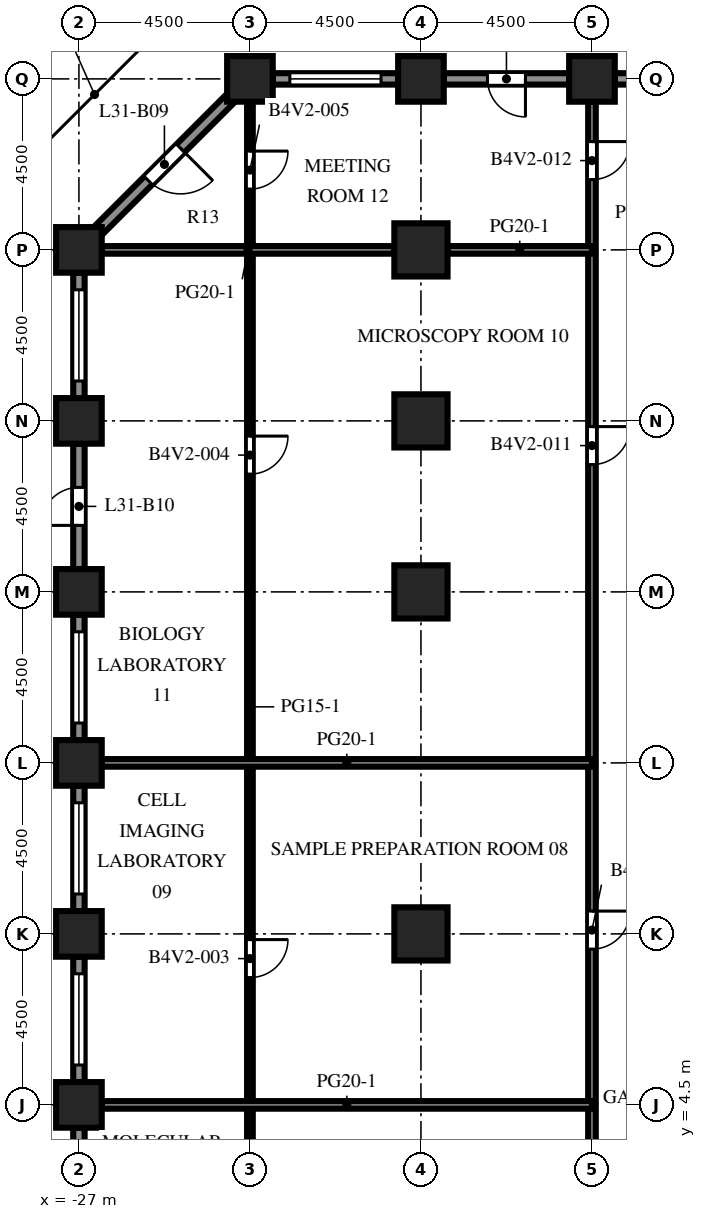
"""IFC4 building model, lengths in metres.
Left out: names, types, materials, properties, quantities, classifications, styles, units other than length and angle.
Written with IfcOpenShell. Run it as: python <this file> out.ifc"""

import sys

from ifc_helpers import new_model, si_unit, direction, frame, frame_2d, origin, origin_2d, place, context, subcontext, project, spatial, rectangle, extrude, element, fill, save


model = new_model("IFC4")
c1 = context("Model", 3, precision=1e-05, world=origin(), true_north=direction((0.0, 1.0)))
c2 = subcontext(c1, "Body", "Model", "MODEL_VIEW")
j1 = project(units=[si_unit("LENGTHUNIT", "METRE"), si_unit("PLANEANGLEUNIT", "RADIAN")], contexts=[c1])
p1 = place(None, origin())
s1 = spatial("IfcSite", under=j1, at=p1, CompositionType="ELEMENT")
p2 = place(p1, origin())
s2 = spatial("IfcBuilding", under=s1, at=p2, CompositionType="ELEMENT")
p3 = place(p2, frame((0.0, 0.0, 137.2)))
s3 = spatial("IfcBuildingStorey", under=s2, at=p3, CompositionType="ELEMENT", Elevation=137.2)
for number, where, z_axis, x_axis in (
    (1, (-27.0, 4.5, 0.0), (0.0, 0.0, 1.0), (1.0, 0.0, 0.0)),
    (2, (-27.0, 9.0, 0.0), (0.0, 0.0, 1.0), (1.0, 0.0, 0.0)),
    (3, (-27.0, 13.5, 0.0), (0.0, 0.0, 1.0), (1.0, 0.0, 0.0)),
    (4, (-27.0, 18.0, 0.0), (0.0, 0.0, 1.0), (1.0, 0.0, 0.0)),
    (5, (-27.0, 22.5, 0.0), (0.0, 0.0, 1.0), (1.0, 0.0, 0.0)),
    (6, (-27.0, 27.0, 0.0), (0.0, 0.0, 1.0), (1.0, 0.0, 0.0)),
    (7, (-22.5, 31.5, 0.0), (0.0, 0.0, 1.0), (1.0, 0.0, 0.0)),
    (8, (-18.0, 31.5, 0.0), (0.0, 0.0, 1.0), (1.0, 0.0, 0.0)),
    (9, (-13.5, 31.5, 0.0), (0.0, 0.0, 1.0), (1.0, 0.0, 0.0)),
):
    element("IfcColumn", number, at=place(p3, frame(where, z_axis=z_axis, x_axis=x_axis)), inside=s3, PredefinedType="COLUMN", context=c2, shape_type="SweptSolid", body=[
        extrude(rectangle(XDim=1.2, YDim=1.2, at=origin_2d()), origin(), (0.0, 0.0, 1.0), 4.1),
    ])
for number, where, z_axis, x_axis in (
    (10, (-18.0, 9.0, 0.0), (0.0, 0.0, 1.0), (1.0, 0.0, 0.0)),
    (11, (-18.0, 18.0, 0.0), (0.0, 0.0, 1.0), (1.0, 0.0, 0.0)),
    (12, (-18.0, 22.5, 0.0), (0.0, 0.0, 1.0), (1.0, 0.0, 0.0)),
    (13, (-18.0, 27.0, 0.0), (0.0, 0.0, 1.0), (1.0, 0.0, 0.0)),
):
    element("IfcColumn", number, at=place(p3, frame(where, z_axis=z_axis, x_axis=x_axis)), inside=s3, PredefinedType="COLUMN", context=c2, shape_type="SweptSolid", body=[
        extrude(rectangle(XDim=1.4, YDim=1.4, at=origin_2d()), origin(), (0.0, 0.0, 1.0), 4.1),
    ])
p4 = place(p3, frame((-12.9, 31.5, 0.0), z_axis=(0.0, 0.0, 1.0), x_axis=(1.0, 0.0, 0.0)))
e14 = element("IfcWall", 14, at=p4, inside=s3, PredefinedType="SOLIDWALL", context=c2, shape_type="SweptSolid", body=[
    extrude(rectangle(XDim=3.3, YDim=0.3, at=frame_2d((1.65, 0.0))), origin(), (0.0, 0.0, 1.0), 2.75),
])
p5 = place(p4, frame((0.525, 0.0, 0.8)))
e15 = element("IfcOpeningElement", 15, at=p5, cuts=e14, PredefinedType="OPENING", context=c2, shape_type="SweptSolid", body=[
    extrude(rectangle(XDim=1.2, YDim=1.7, at=frame_2d((0.6, 0.85))), frame((0.0, 0.16, 0.0), z_axis=(0.0, -1.0, 0.0), x_axis=(1.0, 0.0, 0.0)), (0.0, 0.0, 1.0), 0.32),
])
p6 = place(p3, frame((-17.4, 31.5, 0.0), z_axis=(0.0, 0.0, 1.0), x_axis=(1.0, 0.0, 0.0)))
e16 = element("IfcWall", 16, at=p6, inside=s3, PredefinedType="SOLIDWALL", context=c2, shape_type="SweptSolid", body=[
    extrude(rectangle(XDim=3.3, YDim=0.3, at=frame_2d((1.65, 0.0))), origin(), (0.0, 0.0, 1.0), 2.75),
])
p7 = place(p6, frame((1.15, 0.0, 0.0)))
e17 = element("IfcOpeningElement", 17, at=p7, cuts=e16, PredefinedType="OPENING", context=c2, shape_type="SweptSolid", body=[
    extrude(rectangle(XDim=1.0, YDim=2.2, at=frame_2d((0.5, 1.1))), frame((0.0, 0.16, 0.0), z_axis=(0.0, -1.0, 0.0), x_axis=(1.0, 0.0, 0.0)), (0.0, 0.0, 1.0), 0.32),
])
p8 = place(p3, frame((-21.9, 31.5, 0.0), z_axis=(0.0, 0.0, 1.0), x_axis=(1.0, 0.0, 0.0)))
e18 = element("IfcWall", 18, at=p8, inside=s3, PredefinedType="SOLIDWALL", context=c2, shape_type="SweptSolid", body=[
    extrude(rectangle(XDim=3.3, YDim=0.3, at=frame_2d((1.65, 0.0))), origin(), (0.0, 0.0, 1.0), 2.75),
])
p9 = place(p8, frame((0.45, 0.0, 0.8)))
e19 = element("IfcOpeningElement", 19, at=p9, cuts=e18, PredefinedType="OPENING", context=c2, shape_type="SweptSolid", body=[
    extrude(rectangle(XDim=2.4, YDim=1.7, at=frame_2d((1.2, 0.85))), frame((0.0, 0.16, 0.0), z_axis=(0.0, -1.0, 0.0), x_axis=(1.0, 0.0, 0.0)), (0.0, 0.0, 1.0), 0.32),
])
p10 = place(p3, frame((-26.506, 27.494, 0.0), z_axis=(0.0, 0.0, 1.0), x_axis=(0.707106781187, 0.707106781187, 0.0)))
e20 = element("IfcWall", 20, at=p10, inside=s3, PredefinedType="SOLIDWALL", context=c2, shape_type="SweptSolid", body=[
    extrude(rectangle(XDim=4.967, YDim=0.3, at=frame_2d((2.483, 0.0))), origin(), (0.0, 0.0, 1.0), 2.75),
])
p11 = place(p10, frame((1.884, 0.0, 0.0)))
e21 = element("IfcOpeningElement", 21, at=p11, cuts=e20, PredefinedType="OPENING", context=c2, shape_type="SweptSolid", body=[
    extrude(rectangle(XDim=1.2, YDim=2.2, at=frame_2d((0.6, 1.1))), frame((0.0, 0.16, 0.0), z_axis=(0.0, -1.0, 0.0), x_axis=(1.0, 0.0, 0.0)), (0.0, 0.0, 1.0), 0.32),
])
p12 = place(p3, frame((-27.0, 23.1, 0.0), z_axis=(0.0, 0.0, 1.0), x_axis=(0.0, 1.0, 0.0)))
e22 = element("IfcWall", 22, at=p12, inside=s3, PredefinedType="SOLIDWALL", context=c2, shape_type="SweptSolid", body=[
    extrude(rectangle(XDim=3.3, YDim=0.3, at=frame_2d((1.65, 0.0))), origin(), (0.0, 0.0, 1.0), 2.75),
])
p13 = place(p12, frame((0.45, 0.0, 0.8)))
e23 = element("IfcOpeningElement", 23, at=p13, cuts=e22, PredefinedType="OPENING", context=c2, shape_type="SweptSolid", body=[
    extrude(rectangle(XDim=2.4, YDim=1.7, at=frame_2d((1.2, 0.85))), frame((0.0, 0.16, 0.0), z_axis=(0.0, -1.0, 0.0), x_axis=(1.0, 0.0, 0.0)), (0.0, 0.0, 1.0), 0.32),
])
p14 = place(p3, frame((-27.0, 18.6, 0.0), z_axis=(0.0, 0.0, 1.0), x_axis=(0.0, 1.0, 0.0)))
e24 = element("IfcWall", 24, at=p14, inside=s3, PredefinedType="SOLIDWALL", context=c2, shape_type="SweptSolid", body=[
    extrude(rectangle(XDim=3.3, YDim=0.3, at=frame_2d((1.65, 0.0))), origin(), (0.0, 0.0, 1.0), 2.75),
])
p15 = place(p14, frame((1.15, 0.0, 0.0)))
e25 = element("IfcOpeningElement", 25, at=p15, cuts=e24, PredefinedType="OPENING", context=c2, shape_type="SweptSolid", body=[
    extrude(rectangle(XDim=1.0, YDim=2.2, at=frame_2d((0.5, 1.1))), frame((0.0, 0.16, 0.0), z_axis=(0.0, -1.0, 0.0), x_axis=(1.0, 0.0, 0.0)), (0.0, 0.0, 1.0), 0.32),
])
p16 = place(p3, frame((-27.0, 14.1, 0.0), z_axis=(0.0, 0.0, 1.0), x_axis=(0.0, 1.0, 0.0)))
e26 = element("IfcWall", 26, at=p16, inside=s3, PredefinedType="SOLIDWALL", context=c2, shape_type="SweptSolid", body=[
    extrude(rectangle(XDim=3.3, YDim=0.3, at=frame_2d((1.65, 0.0))), origin(), (0.0, 0.0, 1.0), 2.75),
])
p17 = place(p16, frame((0.45, 0.0, 0.8)))
e27 = element("IfcOpeningElement", 27, at=p17, cuts=e26, PredefinedType="OPENING", context=c2, shape_type="SweptSolid", body=[
    extrude(rectangle(XDim=2.4, YDim=1.7, at=frame_2d((1.2, 0.85))), frame((0.0, 0.16, 0.0), z_axis=(0.0, -1.0, 0.0), x_axis=(1.0, 0.0, 0.0)), (0.0, 0.0, 1.0), 0.32),
])
p18 = place(p3, frame((-27.0, 9.6, 0.0), z_axis=(0.0, 0.0, 1.0), x_axis=(0.0, 1.0, 0.0)))
e28 = element("IfcWall", 28, at=p18, inside=s3, PredefinedType="SOLIDWALL", context=c2, shape_type="SweptSolid", body=[
    extrude(rectangle(XDim=3.3, YDim=0.3, at=frame_2d((1.65, 0.0))), origin(), (0.0, 0.0, 1.0), 2.75),
])
p19 = place(p18, frame((0.45, 0.0, 0.8)))
e29 = element("IfcOpeningElement", 29, at=p19, cuts=e28, PredefinedType="OPENING", context=c2, shape_type="SweptSolid", body=[
    extrude(rectangle(XDim=2.4, YDim=1.7, at=frame_2d((1.2, 0.85))), frame((0.0, 0.16, 0.0), z_axis=(0.0, -1.0, 0.0), x_axis=(1.0, 0.0, 0.0)), (0.0, 0.0, 1.0), 0.32),
])
p20 = place(p3, frame((-27.0, 5.1, 0.0), z_axis=(0.0, 0.0, 1.0), x_axis=(0.0, 1.0, 0.0)))
e30 = element("IfcWall", 30, at=p20, inside=s3, PredefinedType="SOLIDWALL", context=c2, shape_type="SweptSolid", body=[
    extrude(rectangle(XDim=3.3, YDim=0.3, at=frame_2d((1.65, 0.0))), origin(), (0.0, 0.0, 1.0), 2.75),
])
p21 = place(p20, frame((0.45, 0.0, 0.8)))
e31 = element("IfcOpeningElement", 31, at=p21, cuts=e30, PredefinedType="OPENING", context=c2, shape_type="SweptSolid", body=[
    extrude(rectangle(XDim=2.4, YDim=1.7, at=frame_2d((1.2, 0.85))), frame((0.0, 0.16, 0.0), z_axis=(0.0, -1.0, 0.0), x_axis=(1.0, 0.0, 0.0)), (0.0, 0.0, 1.0), 0.32),
])
p22 = place(p3, frame((-27.0, 0.6, 0.0), z_axis=(0.0, 0.0, 1.0), x_axis=(0.0, 1.0, 0.0)))
e32 = element("IfcWall", 32, at=p22, inside=s3, PredefinedType="SOLIDWALL", context=c2, shape_type="SweptSolid", body=[
    extrude(rectangle(XDim=3.3, YDim=0.3, at=frame_2d((1.65, 0.0))), origin(), (0.0, 0.0, 1.0), 2.75),
])
p23 = place(p22, frame((0.45, 0.0, 0.8)))
e33 = element("IfcOpeningElement", 33, at=p23, cuts=e32, PredefinedType="OPENING", context=c2, shape_type="SweptSolid", body=[
    extrude(rectangle(XDim=2.4, YDim=1.7, at=frame_2d((1.2, 0.85))), frame((0.0, 0.16, 0.0), z_axis=(0.0, -1.0, 0.0), x_axis=(1.0, 0.0, 0.0)), (0.0, 0.0, 1.0), 0.32),
])
p24 = place(p3, frame((-22.5, -21.9, 0.0), z_axis=(0.0, 0.0, 1.0), x_axis=(0.0, 1.0, 0.0)))
e34 = element("IfcWall", 34, at=p24, inside=s3, PredefinedType="PARTITIONING", context=c2, shape_type="SweptSolid", body=[
    extrude(rectangle(XDim=52.8, YDim=0.15, at=frame_2d((26.4, 0.0))), origin(), (0.0, 0.0, 1.0), 3.65),
])
p25 = place(p24, frame((5.75, 0.0, 0.0)))
e35 = element("IfcOpeningElement", 35, at=p25, cuts=e34, PredefinedType="OPENING", context=c2, shape_type="SweptSolid", body=[
    extrude(rectangle(XDim=1.0, YDim=2.1, at=frame_2d((0.5, 1.05))), frame((0.0, 0.085, 0.0), z_axis=(0.0, -1.0, 0.0), x_axis=(1.0, 0.0, 0.0)), (0.0, 0.0, 1.0), 0.17),
])
p26 = place(p24, frame((17.0, 0.0, 0.0)))
e36 = element("IfcOpeningElement", 36, at=p26, cuts=e34, PredefinedType="OPENING", context=c2, shape_type="SweptSolid", body=[
    extrude(rectangle(XDim=1.0, YDim=2.1, at=frame_2d((0.5, 1.05))), frame((0.0, 0.085, 0.0), z_axis=(0.0, -1.0, 0.0), x_axis=(1.0, 0.0, 0.0)), (0.0, 0.0, 1.0), 0.17),
])
p27 = place(p24, frame((29.75, 0.0, 0.0)))
e37 = element("IfcOpeningElement", 37, at=p27, cuts=e34, PredefinedType="OPENING", context=c2, shape_type="SweptSolid", body=[
    extrude(rectangle(XDim=1.0, YDim=2.1, at=frame_2d((0.5, 1.05))), frame((0.0, 0.085, 0.0), z_axis=(0.0, -1.0, 0.0), x_axis=(1.0, 0.0, 0.0)), (0.0, 0.0, 1.0), 0.17),
])
p28 = place(p24, frame((43.0, 0.0, 0.0)))
e38 = element("IfcOpeningElement", 38, at=p28, cuts=e34, PredefinedType="OPENING", context=c2, shape_type="SweptSolid", body=[
    extrude(rectangle(XDim=1.0, YDim=2.1, at=frame_2d((0.5, 1.05))), frame((0.0, 0.085, 0.0), z_axis=(0.0, -1.0, 0.0), x_axis=(1.0, 0.0, 0.0)), (0.0, 0.0, 1.0), 0.17),
])
p29 = place(p24, frame((50.5, 0.0, 0.0)))
e39 = element("IfcOpeningElement", 39, at=p29, cuts=e34, PredefinedType="OPENING", context=c2, shape_type="SweptSolid", body=[
    extrude(rectangle(XDim=1.0, YDim=2.1, at=frame_2d((0.5, 1.05))), frame((0.0, 0.085, 0.0), z_axis=(0.0, -1.0, 0.0), x_axis=(1.0, 0.0, 0.0)), (0.0, 0.0, 1.0), 0.17),
])
p30 = place(p3, frame((-13.5, -21.9, 0.0), z_axis=(0.0, 0.0, 1.0), x_axis=(0.0, 1.0, 0.0)))
e40 = element("IfcWall", 40, at=p30, inside=s3, PredefinedType="PARTITIONING", context=c2, shape_type="SweptSolid", body=[
    extrude(rectangle(XDim=52.8, YDim=0.2, at=frame_2d((26.4, 0.0))), origin(), (0.0, 0.0, 1.0), 3.65),
])
p31 = place(p30, frame((7.0, 0.0, 0.0)))
e41 = element("IfcOpeningElement", 41, at=p31, cuts=e40, PredefinedType="OPENING", context=c2, shape_type="SweptSolid", body=[
    extrude(rectangle(XDim=1.0, YDim=2.1, at=frame_2d((0.5, 1.05))), frame((0.0, 0.11, 0.0), z_axis=(0.0, -1.0, 0.0), x_axis=(1.0, 0.0, 0.0)), (0.0, 0.0, 1.0), 0.22),
])
p32 = place(p30, frame((19.75, 0.0, 0.0)))
e42 = element("IfcOpeningElement", 42, at=p32, cuts=e40, PredefinedType="OPENING", context=c2, shape_type="SweptSolid", body=[
    extrude(rectangle(XDim=1.0, YDim=2.1, at=frame_2d((0.5, 1.05))), frame((0.0, 0.11, 0.0), z_axis=(0.0, -1.0, 0.0), x_axis=(1.0, 0.0, 0.0)), (0.0, 0.0, 1.0), 0.22),
])
p33 = place(p30, frame((30.5, 0.0, 0.0)))
e43 = element("IfcOpeningElement", 43, at=p33, cuts=e40, PredefinedType="OPENING", context=c2, shape_type="SweptSolid", body=[
    extrude(rectangle(XDim=1.0, YDim=2.1, at=frame_2d((0.5, 1.05))), frame((0.0, 0.11, 0.0), z_axis=(0.0, -1.0, 0.0), x_axis=(1.0, 0.0, 0.0)), (0.0, 0.0, 1.0), 0.22),
])
p34 = place(p30, frame((43.25, 0.0, 0.0)))
e44 = element("IfcOpeningElement", 44, at=p34, cuts=e40, PredefinedType="OPENING", context=c2, shape_type="SweptSolid", body=[
    extrude(rectangle(XDim=1.0, YDim=2.1, at=frame_2d((0.5, 1.05))), frame((0.0, 0.11, 0.0), z_axis=(0.0, -1.0, 0.0), x_axis=(1.0, 0.0, 0.0)), (0.0, 0.0, 1.0), 0.22),
])
p35 = place(p30, frame((50.75, 0.0, 0.0)))
e45 = element("IfcOpeningElement", 45, at=p35, cuts=e40, PredefinedType="OPENING", context=c2, shape_type="SweptSolid", body=[
    extrude(rectangle(XDim=1.0, YDim=2.1, at=frame_2d((0.5, 1.05))), frame((0.0, 0.11, 0.0), z_axis=(0.0, -1.0, 0.0), x_axis=(1.0, 0.0, 0.0)), (0.0, 0.0, 1.0), 0.22),
])
for number, where, z_axis, x_axis in (
    (46, (-26.4, 4.5, 0.0), (0.0, 0.0, 1.0), (1.0, 0.0, 0.0)),
    (47, (-26.4, 13.5, 0.0), (0.0, 0.0, 1.0), (1.0, 0.0, 0.0)),
):
    element("IfcWall", number, at=place(p3, frame(where, z_axis=z_axis, x_axis=x_axis)), inside=s3, PredefinedType="PARTITIONING", context=c2, shape_type="SweptSolid", body=[
        extrude(rectangle(XDim=12.9, YDim=0.2, at=frame_2d((6.45, 0.0))), origin(), (0.0, 0.0, 1.0), 3.65),
    ])
p36 = place(p3, frame((-26.4, 27.0, 0.0), z_axis=(0.0, 0.0, 1.0), x_axis=(1.0, 0.0, 0.0)))
e48 = element("IfcWall", 48, at=p36, inside=s3, PredefinedType="PARTITIONING", context=c2, shape_type="SweptSolid", body=[
    extrude(rectangle(XDim=7.7, YDim=0.2, at=frame_2d((3.85, 0.0))), origin(), (0.0, 0.0, 1.0), 3.65),
])
p37 = place(p3, frame((-17.3, 27.0, 0.0), z_axis=(0.0, 0.0, 1.0), x_axis=(1.0, 0.0, 0.0)))
e49 = element("IfcWall", 49, at=p37, inside=s3, PredefinedType="PARTITIONING", context=c2, shape_type="SweptSolid", body=[
    extrude(rectangle(XDim=3.8, YDim=0.2, at=frame_2d((1.9, 0.0))), origin(), (0.0, 0.0, 1.0), 3.65),
])
p38 = place(p7, origin())
e50 = element("IfcDoor", 50, at=p38, inside=s3, OperationType="SINGLE_SWING_RIGHT", PredefinedType="DOOR", context=c2, shape_type="SweptSolid", body=[
    extrude(rectangle(XDim=1.0, YDim=2.2, at=frame_2d((0.5, 1.1))), frame((0.0, 0.025, 0.0), z_axis=(0.0, -1.0, 0.0), x_axis=(1.0, 0.0, 0.0)), (0.0, 0.0, 1.0), 0.05),
])
fill(e17, e50)
p39 = place(p9, origin())
e51 = element("IfcWindow", 51, at=p39, inside=s3, PartitioningType="SINGLE_PANEL", PredefinedType="WINDOW", context=c2, shape_type="SweptSolid", body=[
    extrude(rectangle(XDim=2.4, YDim=1.7, at=frame_2d((1.2, 0.85))), frame((0.0, 0.03, 0.0), z_axis=(0.0, -1.0, 0.0), x_axis=(1.0, 0.0, 0.0)), (0.0, 0.0, 1.0), 0.06),
])
fill(e19, e51)
p40 = place(p11, origin())
e52 = element("IfcDoor", 52, at=p40, inside=s3, OperationType="SINGLE_SWING_RIGHT", PredefinedType="DOOR", context=c2, shape_type="SweptSolid", body=[
    extrude(rectangle(XDim=1.2, YDim=2.2, at=frame_2d((0.6, 1.1))), frame((0.0, 0.025, 0.0), z_axis=(0.0, -1.0, 0.0), x_axis=(1.0, 0.0, 0.0)), (0.0, 0.0, 1.0), 0.05),
])
fill(e21, e52)
p41 = place(p13, origin())
e53 = element("IfcWindow", 53, at=p41, inside=s3, PartitioningType="SINGLE_PANEL", PredefinedType="WINDOW", context=c2, shape_type="SweptSolid", body=[
    extrude(rectangle(XDim=2.4, YDim=1.7, at=frame_2d((1.2, 0.85))), frame((0.0, 0.03, 0.0), z_axis=(0.0, -1.0, 0.0), x_axis=(1.0, 0.0, 0.0)), (0.0, 0.0, 1.0), 0.06),
])
fill(e23, e53)
p42 = place(p15, origin())
e54 = element("IfcDoor", 54, at=p42, inside=s3, OperationType="SINGLE_SWING_LEFT", PredefinedType="DOOR", context=c2, shape_type="SweptSolid", body=[
    extrude(rectangle(XDim=1.0, YDim=2.2, at=frame_2d((0.5, 1.1))), frame((0.0, 0.025, 0.0), z_axis=(0.0, -1.0, 0.0), x_axis=(1.0, 0.0, 0.0)), (0.0, 0.0, 1.0), 0.05),
])
fill(e25, e54)
p43 = place(p17, origin())
e55 = element("IfcWindow", 55, at=p43, inside=s3, PartitioningType="SINGLE_PANEL", PredefinedType="WINDOW", context=c2, shape_type="SweptSolid", body=[
    extrude(rectangle(XDim=2.4, YDim=1.7, at=frame_2d((1.2, 0.85))), frame((0.0, 0.03, 0.0), z_axis=(0.0, -1.0, 0.0), x_axis=(1.0, 0.0, 0.0)), (0.0, 0.0, 1.0), 0.06),
])
fill(e27, e55)
p44 = place(p19, origin())
e56 = element("IfcWindow", 56, at=p44, inside=s3, PartitioningType="SINGLE_PANEL", PredefinedType="WINDOW", context=c2, shape_type="SweptSolid", body=[
    extrude(rectangle(XDim=2.4, YDim=1.7, at=frame_2d((1.2, 0.85))), frame((0.0, 0.03, 0.0), z_axis=(0.0, -1.0, 0.0), x_axis=(1.0, 0.0, 0.0)), (0.0, 0.0, 1.0), 0.06),
])
fill(e29, e56)
p45 = place(p21, origin())
e57 = element("IfcWindow", 57, at=p45, inside=s3, PartitioningType="SINGLE_PANEL", PredefinedType="WINDOW", context=c2, shape_type="SweptSolid", body=[
    extrude(rectangle(XDim=2.4, YDim=1.7, at=frame_2d((1.2, 0.85))), frame((0.0, 0.03, 0.0), z_axis=(0.0, -1.0, 0.0), x_axis=(1.0, 0.0, 0.0)), (0.0, 0.0, 1.0), 0.06),
])
fill(e31, e57)
p46 = place(p27, origin())
e58 = element("IfcDoor", 58, at=p46, inside=s3, OperationType="SINGLE_SWING_RIGHT", PredefinedType="DOOR", context=c2, shape_type="SweptSolid", body=[
    extrude(rectangle(XDim=1.0, YDim=2.1, at=frame_2d((0.5, 1.05))), frame((0.0, 0.025, 0.0), z_axis=(0.0, -1.0, 0.0), x_axis=(1.0, 0.0, 0.0)), (0.0, 0.0, 1.0), 0.05),
])
fill(e37, e58)
p47 = place(p28, origin())
e59 = element("IfcDoor", 59, at=p47, inside=s3, OperationType="SINGLE_SWING_RIGHT", PredefinedType="DOOR", context=c2, shape_type="SweptSolid", body=[
    extrude(rectangle(XDim=1.0, YDim=2.1, at=frame_2d((0.5, 1.05))), frame((0.0, 0.025, 0.0), z_axis=(0.0, -1.0, 0.0), x_axis=(1.0, 0.0, 0.0)), (0.0, 0.0, 1.0), 0.05),
])
fill(e38, e59)
p48 = place(p29, origin())
e60 = element("IfcDoor", 60, at=p48, inside=s3, OperationType="SINGLE_SWING_RIGHT", PredefinedType="DOOR", context=c2, shape_type="SweptSolid", body=[
    extrude(rectangle(XDim=1.0, YDim=2.1, at=frame_2d((0.5, 1.05))), frame((0.0, 0.025, 0.0), z_axis=(0.0, -1.0, 0.0), x_axis=(1.0, 0.0, 0.0)), (0.0, 0.0, 1.0), 0.05),
])
fill(e39, e60)
p49 = place(p33, origin())
e61 = element("IfcDoor", 61, at=p49, inside=s3, OperationType="SINGLE_SWING_RIGHT", PredefinedType="DOOR", context=c2, shape_type="SweptSolid", body=[
    extrude(rectangle(XDim=1.0, YDim=2.1, at=frame_2d((0.5, 1.05))), frame((0.0, 0.025, 0.0), z_axis=(0.0, -1.0, 0.0), x_axis=(1.0, 0.0, 0.0)), (0.0, 0.0, 1.0), 0.05),
])
fill(e43, e61)
p50 = place(p34, origin())
e62 = element("IfcDoor", 62, at=p50, inside=s3, OperationType="SINGLE_SWING_RIGHT", PredefinedType="DOOR", context=c2, shape_type="SweptSolid", body=[
    extrude(rectangle(XDim=1.0, YDim=2.1, at=frame_2d((0.5, 1.05))), frame((0.0, 0.025, 0.0), z_axis=(0.0, -1.0, 0.0), x_axis=(1.0, 0.0, 0.0)), (0.0, 0.0, 1.0), 0.05),
])
fill(e44, e62)
p51 = place(p35, origin())
e63 = element("IfcDoor", 63, at=p51, inside=s3, OperationType="SINGLE_SWING_RIGHT", PredefinedType="DOOR", context=c2, shape_type="SweptSolid", body=[
    extrude(rectangle(XDim=1.0, YDim=2.1, at=frame_2d((0.5, 1.05))), frame((0.0, 0.025, 0.0), z_axis=(0.0, -1.0, 0.0), x_axis=(1.0, 0.0, 0.0)), (0.0, 0.0, 1.0), 0.05),
])
fill(e45, e63)
save(model, sys.argv[1])
